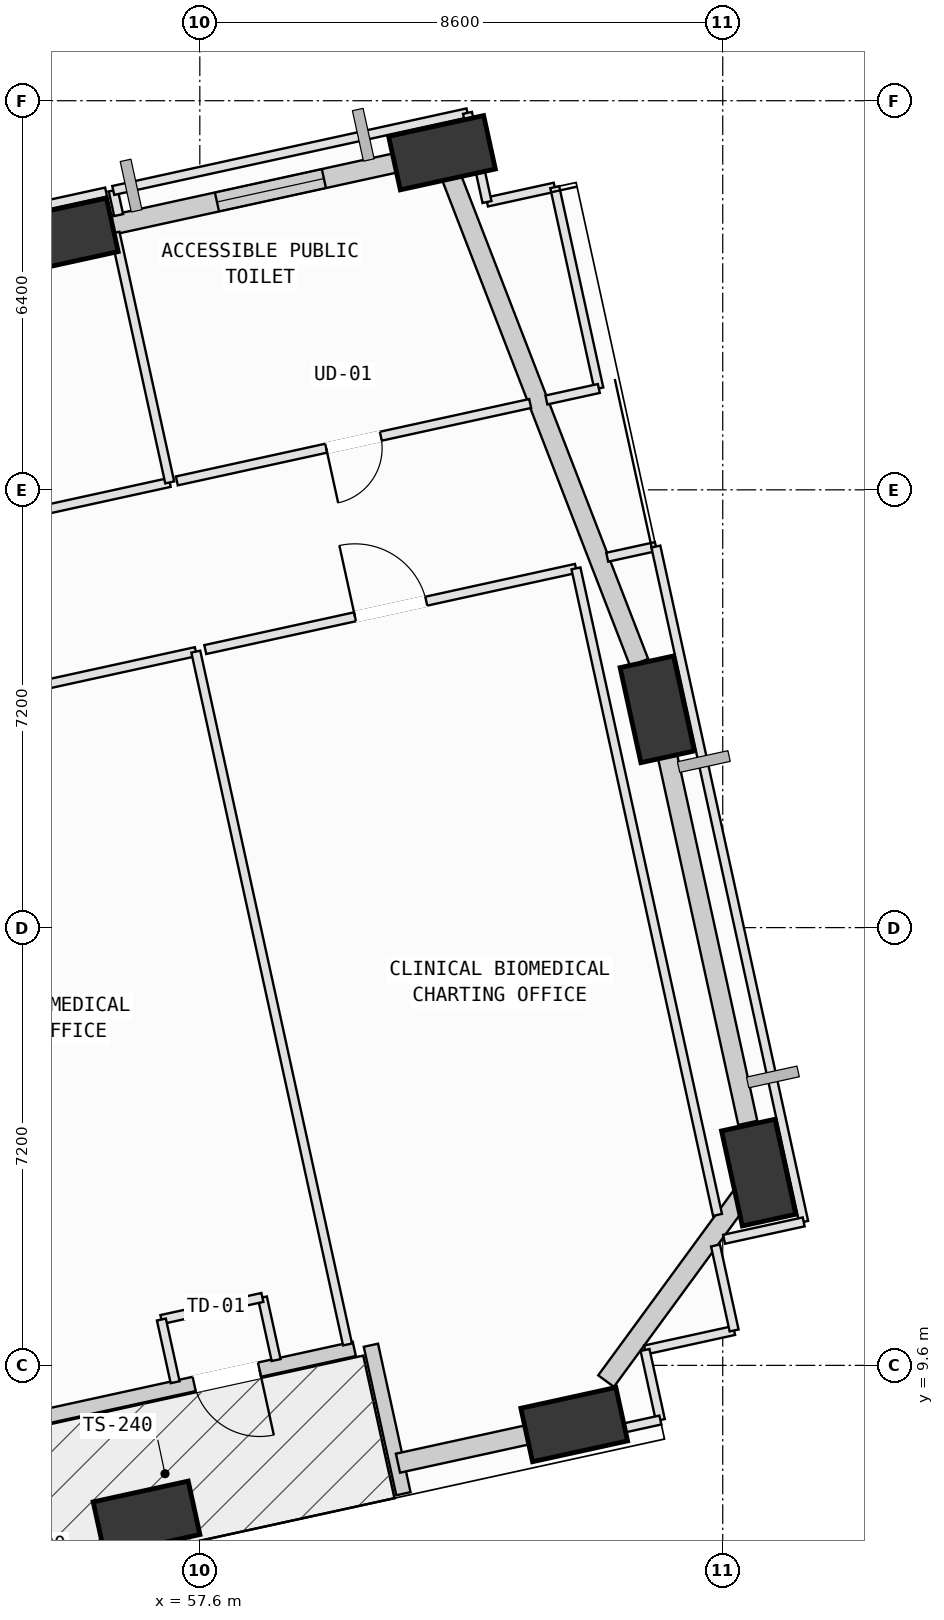
"""IFC4 building model, lengths in metres.
Left out: names, types, materials, properties, quantities, classifications, styles, units other than length and angle.
Written with IfcOpenShell. Run it as: python <this file> out.ifc"""

import sys

from ifc_helpers import new_model, si_unit, direction, frame, frame_2d, origin, origin_2d, place, context, subcontext, project, spatial, rectangle, extrude, element, fill, save


model = new_model("IFC4")
c1 = context("Model", 3, precision=1e-05, world=origin(), true_north=direction((0.0, 1.0)))
c2 = subcontext(c1, "Body", "Model", "MODEL_VIEW")
j1 = project(units=[si_unit("LENGTHUNIT", "METRE"), si_unit("PLANEANGLEUNIT", "RADIAN")], contexts=[c1])
p1 = place(None, origin())
s1 = spatial("IfcSite", under=j1, at=p1, CompositionType="ELEMENT")
p2 = place(p1, origin())
s2 = spatial("IfcBuilding", under=s1, at=p2, CompositionType="ELEMENT")
p3 = place(p2, frame((0.0, 0.0, 75.0)))
s3 = spatial("IfcBuildingStorey", under=s2, at=p3, CompositionType="ELEMENT", Elevation=75.0)
p4 = place(p3, frame((56.724, 7.086, 0.002), z_axis=(0.072109110685, 0.095761384165, 0.992789017596), x_axis=(-0.908089915306, 0.417989639233, 0.025639173424)))
e1 = element("IfcColumn", 1, at=p4, inside=s3, PredefinedType="COLUMN", context=c2, shape_type="SweptSolid", body=[
    extrude(rectangle(XDim=1.6, YDim=0.9, at=origin_2d()), origin(), (0.0, 0.0, 1.0), 4.026),
])
p5 = place(p3, frame((63.757, 8.626, 0.002), z_axis=(0.065380495054, 0.124349951741, 0.990082057391), x_axis=(-0.96318041218, 0.26717144827, 0.030048474522)))
e2 = element("IfcColumn", 2, at=p5, inside=s3, PredefinedType="COLUMN", context=c2, shape_type="SweptSolid", body=[
    extrude(rectangle(XDim=1.6, YDim=0.9, at=origin_2d()), origin(), (0.0, 0.0, 1.0), 4.037),
])
p6 = place(p3, frame((66.791, 12.771, 0.002), z_axis=(0.048233877518, 0.136541766055, 0.98945936712), x_axis=(-0.120274938327, -0.982610338592, 0.141459752942)))
e3 = element("IfcColumn", 3, at=p6, inside=s3, PredefinedType="COLUMN", context=c2, shape_type="SweptSolid", body=[
    extrude(rectangle(XDim=1.6, YDim=0.9, at=origin_2d()), origin(), (0.0, 0.0, 1.0), 4.039),
])
p7 = place(p3, frame((65.123, 20.39, 0.002), z_axis=(0.017018126159, 0.129664797531, 0.99141183353), x_axis=(0.086036237759, -0.988067589993, 0.127750551458)))
e4 = element("IfcColumn", 4, at=p7, inside=s3, PredefinedType="COLUMN", context=c2, shape_type="SweptSolid", body=[
    extrude(rectangle(XDim=1.6, YDim=0.9, at=origin_2d()), origin(), (0.0, 0.0, 1.0), 4.031),
])
p8 = place(p3, frame((61.583, 29.545, 0.002), z_axis=(-0.020506101485, 0.115028308919, 0.993150536399), x_axis=(-0.924417340075, -0.380562816939, 0.024990472814)))
e5 = element("IfcColumn", 5, at=p8, inside=s3, PredefinedType="COLUMN", context=c2, shape_type="SweptSolid", body=[
    extrude(rectangle(XDim=1.6, YDim=0.9, at=origin_2d()), origin(), (0.0, 0.0, 1.0), 4.024),
])
p9 = place(p3, frame((55.38, 28.187, 0.002), z_axis=(-0.014721816855, 0.089790916023, 0.995851826081), x_axis=(-0.929526427486, -0.368241610602, 0.019461161991)))
e6 = element("IfcColumn", 6, at=p9, inside=s3, PredefinedType="COLUMN", context=c2, shape_type="SweptSolid", body=[
    extrude(rectangle(XDim=1.6, YDim=0.9, at=origin_2d()), origin(), (0.0, 0.0, 1.0), 4.013),
])
p10 = place(p3, frame((60.14, 9.871, 0.0), z_axis=(0.0, 0.0, 1.0), x_axis=(-0.976854226767, -0.213906100073, 0.0)))
e7 = element("IfcWall", 7, at=p10, inside=s3, PredefinedType="SOLIDWALL", context=c2, shape_type="SweptSolid", body=[
    extrude(rectangle(XDim=6.96, YDim=0.24, at=frame_2d((3.48, 0.0))), origin(), (0.0, 0.0, 1.0), 3.165),
])
p11 = place(p10, frame((1.596, 0.0, 0.0)))
e8 = element("IfcOpeningElement", 8, at=p11, cuts=e7, PredefinedType="OPENING", context=c2, shape_type="SweptSolid", body=[
    extrude(rectangle(XDim=1.1, YDim=2.15, at=frame_2d((0.55, 1.075))), frame((0.0, 0.13, 0.0), z_axis=(0.0, -1.0, 0.0), x_axis=(1.0, 0.0, 0.0)), (0.0, 0.0, 1.0), 0.26),
])
p12 = place(p3, frame((60.948, 7.489, 0.0), z_axis=(0.0, 0.0, 1.0), x_axis=(-0.213868708035, 0.976862413917, 0.0)))
e9 = element("IfcWall", 9, at=p12, inside=s3, PredefinedType="SOLIDWALL", context=c2, shape_type="SweptSolid", body=[
    extrude(rectangle(XDim=2.5, YDim=0.24, at=frame_2d((1.25, 0.0))), origin(), (0.0, 0.0, 1.0), 3.165),
])
p13 = place(p3, frame((63.381, 8.543, 0.0), z_axis=(0.0, 0.0, 1.0), x_axis=(-0.976858669403, -0.213885810685, 0.0)))
e10 = element("IfcWall", 10, at=p13, inside=s3, PredefinedType="SOLIDWALL", context=c2, shape_type="SweptSolid", body=[
    extrude(rectangle(XDim=2.582, YDim=0.32, at=frame_2d((1.291, 0.0))), origin(), (0.0, 0.0, 1.0), 3.145),
])
p14 = place(p3, frame((66.601, 12.511, 0.0), z_axis=(0.0, 0.0, 1.0), x_axis=(-0.590589974472, -0.806971797558, 0.0)))
e11 = element("IfcWall", 11, at=p14, inside=s3, PredefinedType="SOLIDWALL", context=c2, shape_type="SweptSolid", body=[
    extrude(rectangle(XDim=3.927, YDim=0.32, at=frame_2d((1.964, 0.0))), origin(), (0.0, 0.0, 1.0), 3.165),
])
p15 = place(p3, frame((65.198, 20.045, 0.0), z_axis=(0.0, 0.0, 1.0), x_axis=(0.213883023499, -0.976859279661, 0.0)))
e12 = element("IfcWall", 12, at=p15, inside=s3, PredefinedType="SOLIDWALL", context=c2, shape_type="SweptSolid", body=[
    extrude(rectangle(XDim=6.61, YDim=0.32, at=frame_2d((3.305, 0.0))), origin(), (0.0, 0.0, 1.0), 3.165),
])
p16 = place(p3, frame((61.718, 29.195, 0.0), z_axis=(0.0, 0.0, 1.0), x_axis=(0.360659329065, -0.93269761893, 0.0)))
e13 = element("IfcWall", 13, at=p16, inside=s3, PredefinedType="SOLIDWALL", context=c2, shape_type="SweptSolid", body=[
    extrude(rectangle(XDim=8.614, YDim=0.32, at=frame_2d((4.307, 0.0))), origin(), (0.0, 0.0, 1.0), 3.165),
])
p17 = place(p3, frame((55.956, 28.313, 0.0), z_axis=(0.0, 0.0, 1.0), x_axis=(0.976855050358, 0.213902338907, 0.0)))
e14 = element("IfcWall", 14, at=p17, inside=s3, PredefinedType="SOLIDWALL", context=c2, shape_type="SweptSolid", body=[
    extrude(rectangle(XDim=5.209, YDim=0.32, at=frame_2d((2.604, 0.0))), origin(), (0.0, 0.0, 1.0), 3.165),
])
p18 = place(p17, frame((1.972, 0.0, 0.75)))
e15 = element("IfcOpeningElement", 15, at=p18, cuts=e14, PredefinedType="OPENING", context=c2, shape_type="SweptSolid", body=[
    extrude(rectangle(XDim=1.8, YDim=2.05, at=frame_2d((0.9, 1.025))), frame((0.0, 0.17, 0.0), z_axis=(0.0, -1.0, 0.0), x_axis=(1.0, 0.0, 0.0)), (0.0, 0.0, 1.0), 0.34),
])
p19 = place(p3, frame((49.485, 19.577, 0.0), z_axis=(0.0, 0.0, 1.0), x_axis=(0.976861340805, 0.213873609498, 0.0)))
e16 = element("IfcWall", 16, at=p19, inside=s3, PredefinedType="PARTITIONING", context=c2, shape_type="SweptSolid", body=[
    extrude(rectangle(XDim=8.24, YDim=0.15, at=frame_2d((4.12, 0.0))), origin(), (0.0, 0.0, 1.0), 3.78),
])
p20 = place(p19, frame((3.52, 0.0, 0.0)))
e17 = element("IfcOpeningElement", 17, at=p20, cuts=e16, PredefinedType="OPENING", context=c2, shape_type="SweptSolid", body=[
    extrude(rectangle(XDim=1.2, YDim=2.15, at=frame_2d((0.6, 1.075))), frame((0.0, 0.085, 0.0), z_axis=(0.0, -1.0, 0.0), x_axis=(1.0, 0.0, 0.0)), (0.0, 0.0, 1.0), 0.17),
])
p21 = place(p3, frame((57.534, 21.339, 0.0), z_axis=(0.0, 0.0, 1.0), x_axis=(0.213897858368, -0.976856031453, 0.0)))
e18 = element("IfcWall", 18, at=p21, inside=s3, PredefinedType="PARTITIONING", context=c2, shape_type="SweptSolid", body=[
    extrude(rectangle(XDim=11.665, YDim=0.15, at=frame_2d((5.833, 0.0))), origin(), (0.0, 0.0, 1.0), 3.78),
])
p22 = place(p3, frame((58.855, 9.687, 0.0), z_axis=(0.0, 0.0, 1.0), x_axis=(-0.214380359452, 0.976750255429, 0.0)))
e19 = element("IfcWall", 19, at=p22, inside=s3, PredefinedType="PARTITIONING", context=c2, shape_type="SweptSolid", body=[
    extrude(rectangle(XDim=1.054, YDim=0.15, at=frame_2d((0.527, 0.0))), origin(), (0.0, 0.0, 1.0), 3.78),
])
p23 = place(p3, frame((58.629, 10.717, 0.0), z_axis=(0.0, 0.0, 1.0), x_axis=(-0.976934667461, -0.21353841695, 0.0)))
e20 = element("IfcWall", 20, at=p23, inside=s3, PredefinedType="PARTITIONING", context=c2, shape_type="SweptSolid", body=[
    extrude(rectangle(XDim=1.7, YDim=0.15, at=frame_2d((0.85, 0.0))), origin(), (0.0, 0.0, 1.0), 3.78),
])
p24 = place(p3, frame((56.968, 10.354, 0.0), z_axis=(0.0, 0.0, 1.0), x_axis=(0.21418661944, -0.976792757986, 0.0)))
e21 = element("IfcWall", 21, at=p24, inside=s3, PredefinedType="PARTITIONING", context=c2, shape_type="SweptSolid", body=[
    extrude(rectangle(XDim=1.055, YDim=0.15, at=frame_2d((0.528, 0.0))), origin(), (0.0, 0.0, 1.0), 3.78),
])
p25 = place(p3, frame((66.387, 10.174, 0.0), z_axis=(0.0, 0.0, 1.0), x_axis=(-0.976814973358, -0.214085281661, 0.0)))
e22 = element("IfcWall", 22, at=p25, inside=s3, PredefinedType="PARTITIONING", context=c2, shape_type="SweptSolid", body=[
    extrude(rectangle(XDim=1.5, YDim=0.15, at=frame_2d((0.75, 0.0))), origin(), (0.0, 0.0, 1.0), 3.78),
])
p26 = place(p3, frame((64.922, 9.853, 0.0), z_axis=(0.0, 0.0, 1.0), x_axis=(0.213641313845, -0.976912170576, 0.0)))
e23 = element("IfcWall", 23, at=p26, inside=s3, PredefinedType="PARTITIONING", context=c2, shape_type="SweptSolid", body=[
    extrude(rectangle(XDim=1.179, YDim=0.15, at=frame_2d((0.59, 0.0))), origin(), (0.0, 0.0, 1.0), 3.78),
])
p27 = place(p3, frame((65.174, 8.701, 0.0), z_axis=(0.0, 0.0, 1.0), x_axis=(-0.97686432162, -0.213859994263, 0.0)))
e24 = element("IfcWall", 24, at=p27, inside=s3, PredefinedType="PARTITIONING", context=c2, shape_type="SweptSolid", body=[
    extrude(rectangle(XDim=1.785, YDim=0.15, at=frame_2d((0.893, 0.0))), origin(), (0.0, 0.0, 1.0), 3.78),
])
p28 = place(p3, frame((57.69, 21.373, 0.0), z_axis=(0.0, 0.0, 1.0), x_axis=(0.976850732773, 0.213922055621, 0.0)))
e25 = element("IfcWall", 25, at=p28, inside=s3, PredefinedType="PARTITIONING", context=c2, shape_type="SweptSolid", body=[
    extrude(rectangle(XDim=6.24, YDim=0.15, at=frame_2d((3.12, 0.0))), origin(), (0.0, 0.0, 1.0), 3.78),
])
p29 = place(p28, frame((2.52, 0.0, 0.0)))
e26 = element("IfcOpeningElement", 26, at=p29, cuts=e25, PredefinedType="OPENING", context=c2, shape_type="SweptSolid", body=[
    extrude(rectangle(XDim=1.2, YDim=2.15, at=frame_2d((0.6, 1.075))), frame((0.0, 0.085, 0.0), z_axis=(0.0, -1.0, 0.0), x_axis=(1.0, 0.0, 0.0)), (0.0, 0.0, 1.0), 0.17),
])
p30 = place(p3, frame((63.786, 22.708, 0.0), z_axis=(0.0, 0.0, 1.0), x_axis=(0.213884836968, -0.9768588826, 0.0)))
e27 = element("IfcWall", 27, at=p30, inside=s3, PredefinedType="PARTITIONING", context=c2, shape_type="SweptSolid", body=[
    extrude(rectangle(XDim=10.885, YDim=0.15, at=frame_2d((5.442, 0.0))), origin(), (0.0, 0.0, 1.0), 3.78),
])
p31 = place(p3, frame((66.081, 11.572, 0.0), z_axis=(0.0, 0.0, 1.0), x_axis=(0.213768109417, -0.976884432979, 0.0)))
e28 = element("IfcWall", 28, at=p31, inside=s3, PredefinedType="PARTITIONING", context=c2, shape_type="SweptSolid", body=[
    extrude(rectangle(XDim=1.431, YDim=0.15, at=frame_2d((0.715, 0.0))), origin(), (0.0, 0.0, 1.0), 3.78),
])
p32 = place(p3, frame((57.105, 24.122, 0.0), z_axis=(0.0, 0.0, 1.0), x_axis=(-0.976853250056, -0.213910560411, 0.0)))
e29 = element("IfcWall", 29, at=p32, inside=s3, PredefinedType="PARTITIONING", context=c2, shape_type="SweptSolid", body=[
    extrude(rectangle(XDim=9.813, YDim=0.15, at=frame_2d((4.906, 0.0))), origin(), (0.0, 0.0, 1.0), 3.78),
])
p33 = place(p32, frame((4.307, 0.0, 0.0)))
e30 = element("IfcOpeningElement", 30, at=p33, cuts=e29, PredefinedType="OPENING", context=c2, shape_type="SweptSolid", body=[
    extrude(rectangle(XDim=1.2, YDim=2.15, at=frame_2d((0.6, 1.075))), frame((0.0, 0.085, 0.0), z_axis=(0.0, -1.0, 0.0), x_axis=(1.0, 0.0, 0.0)), (0.0, 0.0, 1.0), 0.17),
])
p34 = place(p3, frame((46.473, 26.8, 0.0), z_axis=(0.0, 0.0, 1.0), x_axis=(0.976880374266, 0.21378665621, 0.0)))
e31 = element("IfcWall", 31, at=p34, inside=s3, PredefinedType="PARTITIONING", context=c2, shape_type="SweptSolid", body=[
    extrude(rectangle(XDim=9.813, YDim=0.15, at=frame_2d((4.906, 0.0))), origin(), (0.0, 0.0, 1.0), 3.165),
])
p35 = place(p3, frame((56.205, 28.229, 0.0), z_axis=(0.0, 0.0, 1.0), x_axis=(0.214039755438, -0.976824950076, 0.0)))
e32 = element("IfcWall", 32, at=p35, inside=s3, PredefinedType="PARTITIONING", context=c2, shape_type="SweptSolid", body=[
    extrude(rectangle(XDim=4.204, YDim=0.15, at=frame_2d((2.102, 0.0))), origin(), (0.0, 0.0, 1.0), 3.78),
])
p36 = place(p3, frame((62.323, 28.734, 0.0), z_axis=(0.0, 0.0, 1.0), x_axis=(0.976817547414, 0.21407353658, 0.0)))
e33 = element("IfcWall", 33, at=p36, inside=s3, PredefinedType="PARTITIONING", context=c2, shape_type="SweptSolid", body=[
    extrude(rectangle(XDim=1.14, YDim=0.15, at=frame_2d((0.57, 0.0))), origin(), (0.0, 0.0, 1.0), 3.78),
])
p37 = place(p3, frame((63.437, 28.978, 0.0), z_axis=(0.0, 0.0, 1.0), x_axis=(0.213924571592, -0.976850181793, 0.0)))
e34 = element("IfcWall", 34, at=p37, inside=s3, PredefinedType="PARTITIONING", context=c2, shape_type="SweptSolid", body=[
    extrude(rectangle(XDim=3.389, YDim=0.15, at=frame_2d((1.695, 0.0))), origin(), (0.0, 0.0, 1.0), 3.78),
])
p38 = place(p3, frame((64.162, 25.667, 0.0), z_axis=(0.0, 0.0, 1.0), x_axis=(-0.97680788608, -0.21411761649, 0.0)))
e35 = element("IfcWall", 35, at=p38, inside=s3, PredefinedType="PARTITIONING", context=c2, shape_type="SweptSolid", body=[
    extrude(rectangle(XDim=0.883, YDim=0.15, at=frame_2d((0.441, 0.0))), origin(), (0.0, 0.0, 1.0), 3.78),
])
p39 = place(p3, frame((63.033, 25.42, 0.0), z_axis=(0.0, 0.0, 1.0), x_axis=(-0.97683732514, -0.213983270871, 0.0)))
e36 = element("IfcWall", 36, at=p39, inside=s3, PredefinedType="PARTITIONING", context=c2, shape_type="SweptSolid", body=[
    extrude(rectangle(XDim=5.949, YDim=0.15, at=frame_2d((2.974, 0.0))), origin(), (0.0, 0.0, 1.0), 3.78),
])
p40 = place(p39, frame((2.514, 0.0, 0.0)))
e37 = element("IfcOpeningElement", 37, at=p40, cuts=e36, PredefinedType="OPENING", context=c2, shape_type="SweptSolid", body=[
    extrude(rectangle(XDim=0.92, YDim=2.1, at=frame_2d((0.46, 1.05))), frame((0.0, 0.085, 0.0), z_axis=(0.0, -1.0, 0.0), x_axis=(1.0, 0.0, 0.0)), (0.0, 0.0, 1.0), 0.17),
])
p41 = place(p3, frame((56.265, 28.519, 0.0), z_axis=(0.0, 0.0, 1.0), x_axis=(-0.21431139353, 0.976765389745, 0.0)))
e38 = element("IfcWall", 38, at=p41, inside=s3, PredefinedType="PARTITIONING", context=c2, shape_type="SweptSolid", body=[
    extrude(rectangle(XDim=0.415, YDim=0.15, at=frame_2d((0.207, 0.0))), origin(), (0.0, 0.0, 1.0), 3.78),
])
p42 = place(p3, frame((56.176, 28.924, 0.0), z_axis=(0.0, 0.0, 1.0), x_axis=(0.976848982064, 0.213930049879, 0.0)))
e39 = element("IfcWall", 39, at=p42, inside=s3, PredefinedType="PARTITIONING", context=c2, shape_type="SweptSolid", body=[
    extrude(rectangle(XDim=5.964, YDim=0.15, at=frame_2d((2.982, 0.0))), origin(), (0.0, 0.0, 1.0), 3.165),
])
p43 = place(p3, frame((62.002, 30.2, 0.0), z_axis=(0.0, 0.0, 1.0), x_axis=(0.213915185985, -0.97685223714, 0.0)))
e40 = element("IfcWall", 40, at=p43, inside=s3, PredefinedType="PARTITIONING", context=c2, shape_type="SweptSolid", body=[
    extrude(rectangle(XDim=1.501, YDim=0.15, at=frame_2d((0.75, 0.0))), origin(), (0.0, 0.0, 1.0), 3.165),
])
p44 = place(p3, frame((64.3, 22.892, 0.0), z_axis=(0.0, 0.0, 1.0), x_axis=(0.976952499966, 0.213456817203, 0.0)))
e41 = element("IfcWall", 41, at=p44, inside=s3, PredefinedType="PARTITIONING", context=c2, shape_type="SweptSolid", body=[
    extrude(rectangle(XDim=0.819, YDim=0.15, at=frame_2d((0.409, 0.0))), origin(), (0.0, 0.0, 1.0), 3.78),
])
p45 = place(p3, frame((65.1, 23.067, 0.0), z_axis=(0.0, 0.0, 1.0), x_axis=(0.213803180167, -0.976876757913, 0.0)))
e42 = element("IfcWall", 42, at=p45, inside=s3, PredefinedType="PARTITIONING", context=c2, shape_type="SweptSolid", body=[
    extrude(rectangle(XDim=11.37, YDim=0.15, at=frame_2d((5.685, 0.0))), origin(), (0.0, 0.0, 1.0), 3.165),
])
p46 = place(p3, frame((67.531, 11.96, 0.0), z_axis=(0.0, 0.0, 1.0), x_axis=(-0.976973655667, -0.213359968442, 0.0)))
e43 = element("IfcWall", 43, at=p46, inside=s3, PredefinedType="PARTITIONING", context=c2, shape_type="SweptSolid", body=[
    extrude(rectangle(XDim=1.34, YDim=0.15, at=frame_2d((0.67, 0.0))), origin(), (0.0, 0.0, 1.0), 3.78),
])
p47 = place(p11, origin())
e44 = element("IfcDoor", 44, at=p47, inside=s3, OperationType="SINGLE_SWING_LEFT", PredefinedType="DOOR", context=c2, shape_type="SweptSolid", body=[
    extrude(rectangle(XDim=1.1, YDim=2.15, at=frame_2d((0.55, 1.075))), frame((0.0, 0.025, 0.0), z_axis=(0.0, -1.0, 0.0), x_axis=(1.0, 0.0, 0.0)), (0.0, 0.0, 1.0), 0.05),
])
fill(e8, e44)
p48 = place(p18, origin())
e45 = element("IfcWindow", 45, at=p48, inside=s3, PartitioningType="SINGLE_PANEL", PredefinedType="WINDOW", context=c2, shape_type="SweptSolid", body=[
    extrude(rectangle(XDim=1.8, YDim=2.05, at=frame_2d((0.9, 1.025))), frame((0.0, 0.03, 0.0), z_axis=(0.0, -1.0, 0.0), x_axis=(1.0, 0.0, 0.0)), (0.0, 0.0, 1.0), 0.06),
])
fill(e15, e45)
p49 = place(p29, origin())
e46 = element("IfcDoor", 46, at=p49, inside=s3, OperationType="SINGLE_SWING_LEFT", PredefinedType="DOOR", context=c2, shape_type="SweptSolid", body=[
    extrude(rectangle(XDim=1.2, YDim=2.15, at=frame_2d((0.6, 1.075))), frame((0.0, 0.025, 0.0), z_axis=(0.0, -1.0, 0.0), x_axis=(1.0, 0.0, 0.0)), (0.0, 0.0, 1.0), 0.05),
])
fill(e26, e46)
p50 = place(p40, origin())
e47 = element("IfcDoor", 47, at=p50, inside=s3, OperationType="SINGLE_SWING_RIGHT", PredefinedType="DOOR", context=c2, shape_type="SweptSolid", body=[
    extrude(rectangle(XDim=0.92, YDim=2.1, at=frame_2d((0.46, 1.05))), frame((0.0, 0.025, 0.0), z_axis=(0.0, -1.0, 0.0), x_axis=(1.0, 0.0, 0.0)), (0.0, 0.0, 1.0), 0.05),
])
fill(e37, e47)
save(model, sys.argv[1])
